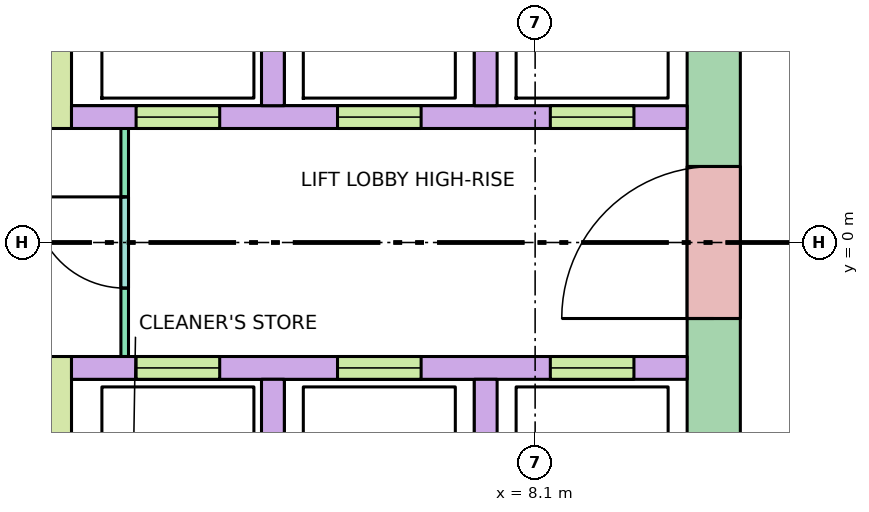
"""IFC4 building model, lengths in metres.
Left out: names, types, materials, properties, quantities, classifications, styles, units other than length and angle.
Written with IfcOpenShell. Run it as: python <this file> out.ifc"""

import sys

from ifc_helpers import new_model, si_unit, direction, frame, frame_2d, origin, place, context, subcontext, project, spatial, rectangle, extrude, element, fill, save


model = new_model("IFC4")
c1 = context("Model", 3, precision=1e-05, world=origin(), true_north=direction((0.0, 1.0)))
c2 = subcontext(c1, "Body", "Model", "MODEL_VIEW")
j1 = project(units=[si_unit("LENGTHUNIT", "METRE"), si_unit("PLANEANGLEUNIT", "RADIAN")], contexts=[c1])
p1 = place(None, origin())
s1 = spatial("IfcSite", under=j1, at=p1, CompositionType="ELEMENT")
p2 = place(p1, origin())
s2 = spatial("IfcBuilding", under=s1, at=p2, CompositionType="ELEMENT")
p3 = place(p2, frame((0.0, 0.0, 192.8)))
s3 = spatial("IfcBuildingStorey", under=s2, at=p3, CompositionType="ELEMENT", Elevation=192.8)
p4 = place(p3, frame((10.45, -5.13, -0.28), z_axis=(0.0, 0.0, 1.0), x_axis=(0.0, 1.0, 0.0)))
e1 = element("IfcWall", 1, at=p4, inside=s3, PredefinedType="SHEAR", context=c2, shape_type="SweptSolid", body=[
    extrude(rectangle(XDim=10.26, YDim=0.7, at=frame_2d((5.13, 0.0))), origin(), (0.0, 0.0, 1.0), 3.7),
])
p5 = place(p4, frame((4.13, 0.0, 0.28)))
e2 = element("IfcOpeningElement", 2, at=p5, cuts=e1, PredefinedType="OPENING", context=c2, shape_type="SweptSolid", body=[
    extrude(rectangle(XDim=2.0, YDim=2.1, at=frame_2d((1.0, 1.05))), frame((0.0, 0.36, 0.0), z_axis=(0.0, -1.0, 0.0), x_axis=(1.0, 0.0, 0.0)), (0.0, 0.0, 1.0), 0.72),
])
p6 = place(p3, frame((2.0, 1.65, 0.0), z_axis=(0.0, 0.0, 1.0), x_axis=(1.0, 0.0, 0.0)))
e3 = element("IfcWall", 3, at=p6, inside=s3, PredefinedType="SOLIDWALL", context=c2, shape_type="SweptSolid", body=[
    extrude(rectangle(XDim=8.1, YDim=0.3, at=frame_2d((4.05, 0.0))), origin(), (0.0, 0.0, 1.0), 3.42),
])
p7 = place(p6, frame((0.85, 0.0, 0.0)))
e4 = element("IfcOpeningElement", 4, at=p7, cuts=e3, PredefinedType="OPENING", context=c2, shape_type="SweptSolid", body=[
    extrude(rectangle(XDim=1.1, YDim=2.1, at=frame_2d((0.55, 1.05))), frame((0.0, 0.16, 0.0), z_axis=(0.0, -1.0, 0.0), x_axis=(1.0, 0.0, 0.0)), (0.0, 0.0, 1.0), 0.32),
])
p8 = place(p6, frame((3.5, 0.0, 0.0)))
e5 = element("IfcOpeningElement", 5, at=p8, cuts=e3, PredefinedType="OPENING", context=c2, shape_type="SweptSolid", body=[
    extrude(rectangle(XDim=1.1, YDim=2.1, at=frame_2d((0.55, 1.05))), frame((0.0, 0.16, 0.0), z_axis=(0.0, -1.0, 0.0), x_axis=(1.0, 0.0, 0.0)), (0.0, 0.0, 1.0), 0.32),
])
p9 = place(p6, frame((6.3, 0.0, 0.0)))
e6 = element("IfcOpeningElement", 6, at=p9, cuts=e3, PredefinedType="OPENING", context=c2, shape_type="SweptSolid", body=[
    extrude(rectangle(XDim=1.1, YDim=2.1, at=frame_2d((0.55, 1.05))), frame((0.0, 0.16, 0.0), z_axis=(0.0, -1.0, 0.0), x_axis=(1.0, 0.0, 0.0)), (0.0, 0.0, 1.0), 0.32),
])
p10 = place(p3, frame((2.0, -1.65, 0.0), z_axis=(0.0, 0.0, 1.0), x_axis=(1.0, 0.0, 0.0)))
e7 = element("IfcWall", 7, at=p10, inside=s3, PredefinedType="SOLIDWALL", context=c2, shape_type="SweptSolid", body=[
    extrude(rectangle(XDim=8.1, YDim=0.3, at=frame_2d((4.05, 0.0))), origin(), (0.0, 0.0, 1.0), 3.42),
])
p11 = place(p10, frame((0.85, 0.0, 0.0)))
e8 = element("IfcOpeningElement", 8, at=p11, cuts=e7, PredefinedType="OPENING", context=c2, shape_type="SweptSolid", body=[
    extrude(rectangle(XDim=1.1, YDim=2.1, at=frame_2d((0.55, 1.05))), frame((0.0, 0.16, 0.0), z_axis=(0.0, -1.0, 0.0), x_axis=(1.0, 0.0, 0.0)), (0.0, 0.0, 1.0), 0.32),
])
p12 = place(p10, frame((3.5, 0.0, 0.0)))
e9 = element("IfcOpeningElement", 9, at=p12, cuts=e7, PredefinedType="OPENING", context=c2, shape_type="SweptSolid", body=[
    extrude(rectangle(XDim=1.1, YDim=2.1, at=frame_2d((0.55, 1.05))), frame((0.0, 0.16, 0.0), z_axis=(0.0, -1.0, 0.0), x_axis=(1.0, 0.0, 0.0)), (0.0, 0.0, 1.0), 0.32),
])
p13 = place(p10, frame((6.3, 0.0, 0.0)))
e10 = element("IfcOpeningElement", 10, at=p13, cuts=e7, PredefinedType="OPENING", context=c2, shape_type="SweptSolid", body=[
    extrude(rectangle(XDim=1.1, YDim=2.1, at=frame_2d((0.55, 1.05))), frame((0.0, 0.16, 0.0), z_axis=(0.0, -1.0, 0.0), x_axis=(1.0, 0.0, 0.0)), (0.0, 0.0, 1.0), 0.32),
])
for number, where, z_axis, x_axis in (
    (11, (4.65, 1.8, 0.0), (0.0, 0.0, 1.0), (0.0, 1.0, 0.0)),
    (12, (4.65, -4.2, 0.0), (0.0, 0.0, 1.0), (0.0, 1.0, 0.0)),
    (13, (7.45, 1.8, 0.0), (0.0, 0.0, 1.0), (0.0, 1.0, 0.0)),
    (14, (7.45, -4.2, 0.0), (0.0, 0.0, 1.0), (0.0, 1.0, 0.0)),
):
    element("IfcWall", number, at=place(p3, frame(where, z_axis=z_axis, x_axis=x_axis)), inside=s3, PredefinedType="SOLIDWALL", context=c2, shape_type="SweptSolid", body=[
        extrude(rectangle(XDim=2.4, YDim=0.3, at=frame_2d((1.2, 0.0))), origin(), (0.0, 0.0, 1.0), 3.42),
    ])
for number, where, z_axis, x_axis in (
    (15, (1.85, 1.5, 0.0), (0.0, 0.0, 1.0), (0.0, 1.0, 0.0)),
    (16, (1.85, -8.1, 0.0), (0.0, 0.0, 1.0), (0.0, 1.0, 0.0)),
):
    element("IfcWall", number, at=place(p3, frame(where, z_axis=z_axis, x_axis=x_axis)), inside=s3, PredefinedType="SHEAR", context=c2, shape_type="SweptSolid", body=[
        extrude(rectangle(XDim=6.6, YDim=0.3, at=frame_2d((3.3, 0.0))), origin(), (0.0, 0.0, 1.0), 3.42),
    ])
p14 = place(p3, frame((2.7, -1.5, 0.0), z_axis=(0.0, 0.0, 1.0), x_axis=(0.0, 1.0, 0.0)))
e17 = element("IfcWall", 17, at=p14, inside=s3, PredefinedType="PARTITIONING", context=c2, shape_type="SweptSolid", body=[
    extrude(rectangle(XDim=3.0, YDim=0.1, at=frame_2d((1.5, 0.0))), origin(), (0.0, 0.0, 1.0), 3.42),
])
p15 = place(p14, frame((0.9, 0.0, 0.0)))
e18 = element("IfcOpeningElement", 18, at=p15, cuts=e17, PredefinedType="OPENING", context=c2, shape_type="SweptSolid", body=[
    extrude(rectangle(XDim=1.2, YDim=2.1, at=frame_2d((0.6, 1.05))), frame((0.0, 0.06, 0.0), z_axis=(0.0, -1.0, 0.0), x_axis=(1.0, 0.0, 0.0)), (0.0, 0.0, 1.0), 0.12),
])
p16 = place(p7, origin())
e19 = element("IfcDoor", 19, at=p16, inside=s3, OperationType="DOUBLE_DOOR_SLIDING", PredefinedType="DOOR", context=c2, shape_type="SweptSolid", body=[
    extrude(rectangle(XDim=1.1, YDim=2.1, at=frame_2d((0.55, 1.05))), frame((0.0, 0.025, 0.0), z_axis=(0.0, -1.0, 0.0), x_axis=(1.0, 0.0, 0.0)), (0.0, 0.0, 1.0), 0.05),
])
fill(e4, e19)
p17 = place(p8, origin())
e20 = element("IfcDoor", 20, at=p17, inside=s3, OperationType="DOUBLE_DOOR_SLIDING", PredefinedType="DOOR", context=c2, shape_type="SweptSolid", body=[
    extrude(rectangle(XDim=1.1, YDim=2.1, at=frame_2d((0.55, 1.05))), frame((0.0, 0.025, 0.0), z_axis=(0.0, -1.0, 0.0), x_axis=(1.0, 0.0, 0.0)), (0.0, 0.0, 1.0), 0.05),
])
fill(e5, e20)
p18 = place(p9, origin())
e21 = element("IfcDoor", 21, at=p18, inside=s3, OperationType="DOUBLE_DOOR_SLIDING", PredefinedType="DOOR", context=c2, shape_type="SweptSolid", body=[
    extrude(rectangle(XDim=1.1, YDim=2.1, at=frame_2d((0.55, 1.05))), frame((0.0, 0.025, 0.0), z_axis=(0.0, -1.0, 0.0), x_axis=(1.0, 0.0, 0.0)), (0.0, 0.0, 1.0), 0.05),
])
fill(e6, e21)
p19 = place(p11, origin())
e22 = element("IfcDoor", 22, at=p19, inside=s3, OperationType="DOUBLE_DOOR_SLIDING", PredefinedType="DOOR", context=c2, shape_type="SweptSolid", body=[
    extrude(rectangle(XDim=1.1, YDim=2.1, at=frame_2d((0.55, 1.05))), frame((0.0, 0.025, 0.0), z_axis=(0.0, -1.0, 0.0), x_axis=(1.0, 0.0, 0.0)), (0.0, 0.0, 1.0), 0.05),
])
fill(e8, e22)
p20 = place(p12, origin())
e23 = element("IfcDoor", 23, at=p20, inside=s3, OperationType="DOUBLE_DOOR_SLIDING", PredefinedType="DOOR", context=c2, shape_type="SweptSolid", body=[
    extrude(rectangle(XDim=1.1, YDim=2.1, at=frame_2d((0.55, 1.05))), frame((0.0, 0.025, 0.0), z_axis=(0.0, -1.0, 0.0), x_axis=(1.0, 0.0, 0.0)), (0.0, 0.0, 1.0), 0.05),
])
fill(e9, e23)
p21 = place(p13, origin())
e24 = element("IfcDoor", 24, at=p21, inside=s3, OperationType="DOUBLE_DOOR_SLIDING", PredefinedType="DOOR", context=c2, shape_type="SweptSolid", body=[
    extrude(rectangle(XDim=1.1, YDim=2.1, at=frame_2d((0.55, 1.05))), frame((0.0, 0.025, 0.0), z_axis=(0.0, -1.0, 0.0), x_axis=(1.0, 0.0, 0.0)), (0.0, 0.0, 1.0), 0.05),
])
fill(e10, e24)
p22 = place(p5, origin())
e25 = element("IfcDoor", 25, at=p22, inside=s3, OperationType="DOUBLE_DOOR_SINGLE_SWING", PredefinedType="DOOR", context=c2, shape_type="SweptSolid", body=[
    extrude(rectangle(XDim=2.0, YDim=2.1, at=frame_2d((1.0, 1.05))), frame((0.0, 0.025, 0.0), z_axis=(0.0, -1.0, 0.0), x_axis=(1.0, 0.0, 0.0)), (0.0, 0.0, 1.0), 0.05),
])
fill(e2, e25)
p23 = place(p15, origin())
e26 = element("IfcDoor", 26, at=p23, inside=s3, OperationType="SINGLE_SWING_RIGHT", PredefinedType="DOOR", context=c2, shape_type="SweptSolid", body=[
    extrude(rectangle(XDim=1.2, YDim=2.1, at=frame_2d((0.6, 1.05))), frame((0.0, 0.025, 0.0), z_axis=(0.0, -1.0, 0.0), x_axis=(1.0, 0.0, 0.0)), (0.0, 0.0, 1.0), 0.05),
])
fill(e18, e26)
save(model, sys.argv[1])
